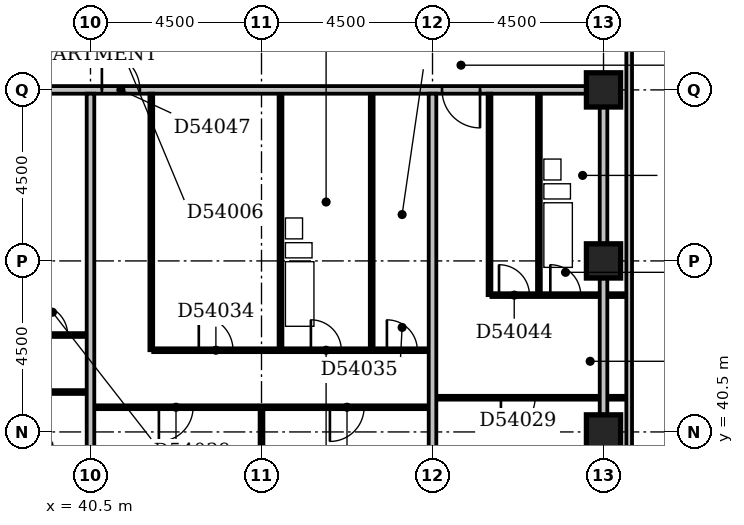
"""IFC4 building model, lengths in metres.
Left out: names, types, materials, properties, quantities, classifications, styles, units other than length and angle.
Written with IfcOpenShell. Run it as: python <this file> out.ifc"""

import sys

from ifc_helpers import new_model, si_unit, direction, frame, frame_2d, origin, origin_2d, place, context, subcontext, project, spatial, rectangle, extrude, element, fill, save


model = new_model("IFC4")
c1 = context("Model", 3, precision=1e-05, world=origin(), true_north=direction((0.0, 1.0)))
c2 = subcontext(c1, "Body", "Model", "MODEL_VIEW")
j1 = project(units=[si_unit("LENGTHUNIT", "METRE"), si_unit("PLANEANGLEUNIT", "RADIAN")], contexts=[c1])
p1 = place(None, origin())
s1 = spatial("IfcSite", under=j1, at=p1, CompositionType="ELEMENT")
p2 = place(p1, origin())
s2 = spatial("IfcBuilding", under=s1, at=p2, CompositionType="ELEMENT")
p3 = place(p2, frame((0.0, 0.0, 211.4)))
s3 = spatial("IfcBuildingStorey", under=s2, at=p3, CompositionType="ELEMENT", Elevation=211.4)
for number, where, z_axis, x_axis in (
    (1, (54.0, 40.5, -0.35), (0.0, 0.0, 1.0), (1.0, 0.0, 0.0)),
    (2, (54.0, 45.0, -0.35), (0.0, 0.0, 1.0), (1.0, 0.0, 0.0)),
    (3, (54.0, 49.5, -0.35), (0.0, 0.0, 1.0), (1.0, 0.0, 0.0)),
):
    element("IfcColumn", number, at=place(p3, frame(where, z_axis=z_axis, x_axis=x_axis)), inside=s3, PredefinedType="COLUMN", context=c2, shape_type="SweptSolid", body=[
        extrude(rectangle(XDim=0.9, YDim=0.9, at=origin_2d()), origin(), (0.0, 0.0, 1.0), 3.65),
    ])
p4 = place(p3, frame((54.675, 39.9, 0.0), z_axis=(0.0, 0.0, 1.0), x_axis=(0.0, 1.0, 0.0)))
e4 = element("IfcWall", 4, at=p4, inside=s3, PredefinedType="STANDARD", context=c2, shape_type="SweptSolid", body=[
    extrude(rectangle(XDim=14.85, YDim=0.15, at=frame_2d((7.425, 0.0))), origin(), (0.0, 0.0, 1.0), 2.7),
])
p5 = place(p3, frame((40.5, 36.45, 0.0), z_axis=(0.0, 0.0, 1.0), x_axis=(0.0, 1.0, 0.0)))
e5 = element("IfcWall", 5, at=p5, inside=s3, PredefinedType="PARTITIONING", context=c2, shape_type="SweptSolid", body=[
    extrude(rectangle(XDim=12.95, YDim=0.2, at=frame_2d((6.475, 0.0))), origin(), (0.0, 0.0, 1.0), 3.3),
])
p6 = place(p3, frame((45.0, 36.45, 0.0), z_axis=(0.0, 0.0, 1.0), x_axis=(0.0, 1.0, 0.0)))
e6 = element("IfcWall", 6, at=p6, inside=s3, PredefinedType="PARTITIONING", context=c2, shape_type="SweptSolid", body=[
    extrude(rectangle(XDim=4.65, YDim=0.1, at=frame_2d((2.325, 0.0))), origin(), (0.0, 0.0, 1.0), 2.6),
])
p7 = place(p3, frame((49.5, 36.45, 0.0), z_axis=(0.0, 0.0, 1.0), x_axis=(0.0, 1.0, 0.0)))
e7 = element("IfcWall", 7, at=p7, inside=s3, PredefinedType="PARTITIONING", context=c2, shape_type="SweptSolid", body=[
    extrude(rectangle(XDim=12.95, YDim=0.2, at=frame_2d((6.475, 0.0))), origin(), (0.0, 0.0, 1.0), 3.3),
])
p8 = place(p3, frame((54.0, 40.95, 0.0), z_axis=(0.0, 0.0, 1.0), x_axis=(0.0, 1.0, 0.0)))
e8 = element("IfcWall", 8, at=p8, inside=s3, PredefinedType="PARTITIONING", context=c2, shape_type="SweptSolid", body=[
    extrude(rectangle(XDim=8.1, YDim=0.2, at=frame_2d((4.05, 0.0))), origin(), (0.0, 0.0, 1.0), 2.7),
])
p9 = place(p3, frame((40.6, 41.15, 0.0), z_axis=(0.0, 0.0, 1.0), x_axis=(1.0, 0.0, 0.0)))
e9 = element("IfcWall", 9, at=p9, inside=s3, PredefinedType="PARTITIONING", context=c2, shape_type="SweptSolid", body=[
    extrude(rectangle(XDim=8.8, YDim=0.1, at=frame_2d((4.4, 0.0))), origin(), (0.0, 0.0, 1.0), 3.3),
])
p10 = place(p9, frame((1.7, 0.0, 0.0)))
e10 = element("IfcOpeningElement", 10, at=p10, cuts=e9, PredefinedType="OPENING", context=c2, shape_type="SweptSolid", body=[
    extrude(rectangle(XDim=0.9, YDim=2.1, at=frame_2d((0.45, 1.05))), frame((0.0, 0.062, 0.0), z_axis=(0.0, -1.0, 0.0), x_axis=(1.0, 0.0, 0.0)), (0.0, 0.0, 1.0), 0.124),
])
p11 = place(p9, frame((6.2, 0.0, 0.0)))
e11 = element("IfcOpeningElement", 11, at=p11, cuts=e9, PredefinedType="OPENING", context=c2, shape_type="SweptSolid", body=[
    extrude(rectangle(XDim=0.9, YDim=2.1, at=frame_2d((0.45, 1.05))), frame((0.0, 0.062, 0.0), z_axis=(0.0, -1.0, 0.0), x_axis=(1.0, 0.0, 0.0)), (0.0, 0.0, 1.0), 0.124),
])
p12 = place(p3, frame((49.6, 41.4, 0.0), z_axis=(0.0, 0.0, 1.0), x_axis=(1.0, 0.0, 0.0)))
e12 = element("IfcWall", 12, at=p12, inside=s3, PredefinedType="PARTITIONING", context=c2, shape_type="SweptSolid", body=[
    extrude(rectangle(XDim=5.0, YDim=0.1, at=frame_2d((2.5, 0.0))), origin(), (0.0, 0.0, 1.0), 3.3),
])
p13 = place(p12, frame((1.7, 0.0, 0.0)))
e13 = element("IfcOpeningElement", 13, at=p13, cuts=e12, PredefinedType="OPENING", context=c2, shape_type="SweptSolid", body=[
    extrude(rectangle(XDim=0.9, YDim=2.1, at=frame_2d((0.45, 1.05))), frame((0.0, 0.062, 0.0), z_axis=(0.0, -1.0, 0.0), x_axis=(1.0, 0.0, 0.0)), (0.0, 0.0, 1.0), 0.124),
])
p14 = place(p3, frame((27.1, 41.55, 0.0), z_axis=(0.0, 0.0, 1.0), x_axis=(1.0, 0.0, 0.0)))
e14 = element("IfcWall", 14, at=p14, inside=s3, PredefinedType="PARTITIONING", context=c2, shape_type="SweptSolid", body=[
    extrude(rectangle(XDim=13.3, YDim=0.1, at=frame_2d((6.65, 0.0))), origin(), (0.0, 0.0, 1.0), 3.3),
])
p15 = place(p14, frame((3.9, 0.0, 0.0)))
e15 = element("IfcOpeningElement", 15, at=p15, cuts=e14, PredefinedType="OPENING", context=c2, shape_type="SweptSolid", body=[
    extrude(rectangle(XDim=0.9, YDim=2.1, at=frame_2d((0.45, 1.05))), frame((0.0, 0.062, 0.0), z_axis=(0.0, -1.0, 0.0), x_axis=(1.0, 0.0, 0.0)), (0.0, 0.0, 1.0), 0.124),
])
p16 = place(p14, frame((10.7, 0.0, 0.0)))
e16 = element("IfcOpeningElement", 16, at=p16, cuts=e14, PredefinedType="OPENING", context=c2, shape_type="SweptSolid", body=[
    extrude(rectangle(XDim=0.9, YDim=2.1, at=frame_2d((0.45, 1.05))), frame((0.0, 0.062, 0.0), z_axis=(0.0, -1.0, 0.0), x_axis=(1.0, 0.0, 0.0)), (0.0, 0.0, 1.0), 0.124),
])
p17 = place(p3, frame((42.1, 42.65, 0.0), z_axis=(0.0, 0.0, 1.0), x_axis=(0.0, 1.0, 0.0)))
e17 = element("IfcWall", 17, at=p17, inside=s3, PredefinedType="PARTITIONING", context=c2, shape_type="SweptSolid", body=[
    extrude(rectangle(XDim=6.75, YDim=0.1, at=frame_2d((3.375, 0.0))), origin(), (0.0, 0.0, 1.0), 3.3),
])
p18 = place(p3, frame((42.15, 42.65, 0.0), z_axis=(0.0, 0.0, 1.0), x_axis=(1.0, 0.0, 0.0)))
e18 = element("IfcWall", 18, at=p18, inside=s3, PredefinedType="PARTITIONING", context=c2, shape_type="SweptSolid", body=[
    extrude(rectangle(XDim=7.25, YDim=0.1, at=frame_2d((3.625, 0.0))), origin(), (0.0, 0.0, 1.0), 3.3),
])
p19 = place(p18, frame((4.15, 0.0, 0.0)))
e19 = element("IfcOpeningElement", 19, at=p19, cuts=e18, PredefinedType="OPENING", context=c2, shape_type="SweptSolid", body=[
    extrude(rectangle(XDim=0.8, YDim=2.1, at=frame_2d((0.4, 1.05))), frame((0.0, 0.062, 0.0), z_axis=(0.0, -1.0, 0.0), x_axis=(1.0, 0.0, 0.0)), (0.0, 0.0, 1.0), 0.124),
])
p20 = place(p18, frame((1.2, 0.0, 0.0)))
e20 = element("IfcOpeningElement", 20, at=p20, cuts=e18, PredefinedType="OPENING", context=c2, shape_type="SweptSolid", body=[
    extrude(rectangle(XDim=0.9, YDim=2.1, at=frame_2d((0.45, 1.05))), frame((0.0, 0.062, 0.0), z_axis=(0.0, -1.0, 0.0), x_axis=(1.0, 0.0, 0.0)), (0.0, 0.0, 1.0), 0.124),
])
p21 = place(p18, frame((6.15, 0.0, 0.0)))
e21 = element("IfcOpeningElement", 21, at=p21, cuts=e18, PredefinedType="OPENING", context=c2, shape_type="SweptSolid", body=[
    extrude(rectangle(XDim=0.8, YDim=2.1, at=frame_2d((0.4, 1.05))), frame((0.0, 0.062, 0.0), z_axis=(0.0, -1.0, 0.0), x_axis=(1.0, 0.0, 0.0)), (0.0, 0.0, 1.0), 0.124),
])
p22 = place(p3, frame((45.5, 42.7, 0.0), z_axis=(0.0, 0.0, 1.0), x_axis=(0.0, 1.0, 0.0)))
e22 = element("IfcWall", 22, at=p22, inside=s3, PredefinedType="PLUMBINGWALL", context=c2, shape_type="SweptSolid", body=[
    extrude(rectangle(XDim=6.7, YDim=0.1, at=frame_2d((3.35, 0.0))), origin(), (0.0, 0.0, 1.0), 2.6),
])
p23 = place(p3, frame((47.9, 42.7, 0.0), z_axis=(0.0, 0.0, 1.0), x_axis=(0.0, 1.0, 0.0)))
e23 = element("IfcWall", 23, at=p23, inside=s3, PredefinedType="PLUMBINGWALL", context=c2, shape_type="SweptSolid", body=[
    extrude(rectangle(XDim=6.7, YDim=0.1, at=frame_2d((3.35, 0.0))), origin(), (0.0, 0.0, 1.0), 3.3),
])
p24 = place(p3, frame((28.65, 43.05, 0.0), z_axis=(0.0, 0.0, 1.0), x_axis=(1.0, 0.0, 0.0)))
e24 = element("IfcWall", 24, at=p24, inside=s3, PredefinedType="PARTITIONING", context=c2, shape_type="SweptSolid", body=[
    extrude(rectangle(XDim=11.75, YDim=0.1, at=frame_2d((5.875, 0.0))), origin(), (0.0, 0.0, 1.0), 3.3),
])
p25 = place(p24, frame((5.15, 0.0, 0.0)))
e25 = element("IfcOpeningElement", 25, at=p25, cuts=e24, PredefinedType="OPENING", context=c2, shape_type="SweptSolid", body=[
    extrude(rectangle(XDim=0.8, YDim=2.1, at=frame_2d((0.4, 1.05))), frame((0.0, 0.062, 0.0), z_axis=(0.0, -1.0, 0.0), x_axis=(1.0, 0.0, 0.0)), (0.0, 0.0, 1.0), 0.124),
])
p26 = place(p24, frame((1.7, 0.0, 0.0)))
e26 = element("IfcOpeningElement", 26, at=p26, cuts=e24, PredefinedType="OPENING", context=c2, shape_type="SweptSolid", body=[
    extrude(rectangle(XDim=0.9, YDim=2.1, at=frame_2d((0.45, 1.05))), frame((0.0, 0.062, 0.0), z_axis=(0.0, -1.0, 0.0), x_axis=(1.0, 0.0, 0.0)), (0.0, 0.0, 1.0), 0.124),
])
p27 = place(p24, frame((8.65, 0.0, 0.0)))
e27 = element("IfcOpeningElement", 27, at=p27, cuts=e24, PredefinedType="OPENING", context=c2, shape_type="SweptSolid", body=[
    extrude(rectangle(XDim=0.8, YDim=2.1, at=frame_2d((0.4, 1.05))), frame((0.0, 0.062, 0.0), z_axis=(0.0, -1.0, 0.0), x_axis=(1.0, 0.0, 0.0)), (0.0, 0.0, 1.0), 0.124),
])
p28 = place(p24, frame((10.45, 0.0, 0.0)))
e28 = element("IfcOpeningElement", 28, at=p28, cuts=e24, PredefinedType="OPENING", context=c2, shape_type="SweptSolid", body=[
    extrude(rectangle(XDim=0.8, YDim=2.1, at=frame_2d((0.4, 1.05))), frame((0.0, 0.062, 0.0), z_axis=(0.0, -1.0, 0.0), x_axis=(1.0, 0.0, 0.0)), (0.0, 0.0, 1.0), 0.124),
])
p29 = place(p24, frame((7.1, 0.0, 0.0)))
e29 = element("IfcOpeningElement", 29, at=p29, cuts=e24, PredefinedType="OPENING", context=c2, shape_type="SweptSolid", body=[
    extrude(rectangle(XDim=0.8, YDim=2.1, at=frame_2d((0.4, 1.05))), frame((0.0, 0.062, 0.0), z_axis=(0.0, -1.0, 0.0), x_axis=(1.0, 0.0, 0.0)), (0.0, 0.0, 1.0), 0.124),
])
p30 = place(p3, frame((51.0, 44.1, 0.0), z_axis=(0.0, 0.0, 1.0), x_axis=(0.0, 1.0, 0.0)))
e30 = element("IfcWall", 30, at=p30, inside=s3, PredefinedType="PARTITIONING", context=c2, shape_type="SweptSolid", body=[
    extrude(rectangle(XDim=5.3, YDim=0.1, at=frame_2d((2.65, 0.0))), origin(), (0.0, 0.0, 1.0), 3.3),
])
p31 = place(p3, frame((51.05, 44.1, 0.0), z_axis=(0.0, 0.0, 1.0), x_axis=(1.0, 0.0, 0.0)))
e31 = element("IfcWall", 31, at=p31, inside=s3, PredefinedType="PARTITIONING", context=c2, shape_type="SweptSolid", body=[
    extrude(rectangle(XDim=3.55, YDim=0.1, at=frame_2d((1.775, 0.0))), origin(), (0.0, 0.0, 1.0), 3.3),
])
p32 = place(p31, frame((1.55, 0.0, 0.0)))
e32 = element("IfcOpeningElement", 32, at=p32, cuts=e31, PredefinedType="OPENING", context=c2, shape_type="SweptSolid", body=[
    extrude(rectangle(XDim=0.8, YDim=2.1, at=frame_2d((0.4, 1.05))), frame((0.0, 0.062, 0.0), z_axis=(0.0, -1.0, 0.0), x_axis=(1.0, 0.0, 0.0)), (0.0, 0.0, 1.0), 0.124),
])
p33 = place(p31, frame((0.2, 0.0, 0.0)))
e33 = element("IfcOpeningElement", 33, at=p33, cuts=e31, PredefinedType="OPENING", context=c2, shape_type="SweptSolid", body=[
    extrude(rectangle(XDim=0.8, YDim=2.1, at=frame_2d((0.4, 1.05))), frame((0.0, 0.062, 0.0), z_axis=(0.0, -1.0, 0.0), x_axis=(1.0, 0.0, 0.0)), (0.0, 0.0, 1.0), 0.124),
])
p34 = place(p3, frame((52.3, 44.15, 0.0), z_axis=(0.0, 0.0, 1.0), x_axis=(0.0, 1.0, 0.0)))
e34 = element("IfcWall", 34, at=p34, inside=s3, PredefinedType="PLUMBINGWALL", context=c2, shape_type="SweptSolid", body=[
    extrude(rectangle(XDim=5.25, YDim=0.1, at=frame_2d((2.625, 0.0))), origin(), (0.0, 0.0, 1.0), 3.3),
])
p35 = place(p3, frame((22.6, 49.5, 0.0), z_axis=(0.0, 0.0, 1.0), x_axis=(1.0, 0.0, 0.0)))
e35 = element("IfcWall", 35, at=p35, inside=s3, PredefinedType="PARTITIONING", context=c2, shape_type="SweptSolid", body=[
    extrude(rectangle(XDim=30.95, YDim=0.2, at=frame_2d((15.475, 0.0))), origin(), (0.0, 0.0, 1.0), 3.3),
])
p36 = place(p35, frame((1.85, 0.0, 0.0)))
e36 = element("IfcOpeningElement", 36, at=p36, cuts=e35, PredefinedType="OPENING", context=c2, shape_type="SweptSolid", body=[
    extrude(rectangle(XDim=1.0, YDim=2.1, at=frame_2d((0.5, 1.05))), frame((0.0, 0.112, 0.0), z_axis=(0.0, -1.0, 0.0), x_axis=(1.0, 0.0, 0.0)), (0.0, 0.0, 1.0), 0.224),
])
p37 = place(p35, frame((4.7, 0.0, 0.0)))
e37 = element("IfcOpeningElement", 37, at=p37, cuts=e35, PredefinedType="OPENING", context=c2, shape_type="SweptSolid", body=[
    extrude(rectangle(XDim=1.0, YDim=2.1, at=frame_2d((0.5, 1.05))), frame((0.0, 0.112, 0.0), z_axis=(0.0, -1.0, 0.0), x_axis=(1.0, 0.0, 0.0)), (0.0, 0.0, 1.0), 0.224),
])
p38 = place(p35, frame((18.2, 0.0, 0.0)))
e38 = element("IfcOpeningElement", 38, at=p38, cuts=e35, PredefinedType="OPENING", context=c2, shape_type="SweptSolid", body=[
    extrude(rectangle(XDim=1.0, YDim=2.1, at=frame_2d((0.5, 1.05))), frame((0.0, 0.112, 0.0), z_axis=(0.0, -1.0, 0.0), x_axis=(1.0, 0.0, 0.0)), (0.0, 0.0, 1.0), 0.224),
])
p39 = place(p35, frame((27.15, 0.0, 0.0)))
e39 = element("IfcOpeningElement", 39, at=p39, cuts=e35, PredefinedType="OPENING", context=c2, shape_type="SweptSolid", body=[
    extrude(rectangle(XDim=1.0, YDim=2.1, at=frame_2d((0.5, 1.05))), frame((0.0, 0.112, 0.0), z_axis=(0.0, -1.0, 0.0), x_axis=(1.0, 0.0, 0.0)), (0.0, 0.0, 1.0), 0.224),
])
p40 = place(p10, frame((0.9, 0.0, 0.0), z_axis=(0.0, 0.0, 1.0), x_axis=(-1.0, 0.0, 0.0)))
e40 = element("IfcDoor", 40, at=p40, inside=s3, OperationType="SINGLE_SWING_RIGHT", PredefinedType="DOOR", context=c2, shape_type="SweptSolid", body=[
    extrude(rectangle(XDim=0.9, YDim=2.1, at=frame_2d((0.45, 1.05))), frame((0.0, 0.025, 0.0), z_axis=(0.0, -1.0, 0.0), x_axis=(1.0, 0.0, 0.0)), (0.0, 0.0, 1.0), 0.05),
])
fill(e10, e40)
p41 = place(p11, frame((0.9, 0.0, 0.0), z_axis=(0.0, 0.0, 1.0), x_axis=(-1.0, 0.0, 0.0)))
e41 = element("IfcDoor", 41, at=p41, inside=s3, OperationType="SINGLE_SWING_RIGHT", PredefinedType="DOOR", context=c2, shape_type="SweptSolid", body=[
    extrude(rectangle(XDim=0.9, YDim=2.1, at=frame_2d((0.45, 1.05))), frame((0.0, 0.025, 0.0), z_axis=(0.0, -1.0, 0.0), x_axis=(1.0, 0.0, 0.0)), (0.0, 0.0, 1.0), 0.05),
])
fill(e11, e41)
p42 = place(p13, frame((0.9, 0.0, 0.0), z_axis=(0.0, 0.0, 1.0), x_axis=(-1.0, 0.0, 0.0)))
e42 = element("IfcDoor", 42, at=p42, inside=s3, OperationType="SINGLE_SWING_RIGHT", PredefinedType="DOOR", context=c2, shape_type="SweptSolid", body=[
    extrude(rectangle(XDim=0.9, YDim=2.1, at=frame_2d((0.45, 1.05))), frame((0.0, 0.025, 0.0), z_axis=(0.0, -1.0, 0.0), x_axis=(1.0, 0.0, 0.0)), (0.0, 0.0, 1.0), 0.05),
])
fill(e13, e42)
p43 = place(p19, origin())
e43 = element("IfcDoor", 43, at=p43, inside=s3, OperationType="SINGLE_SWING_LEFT", PredefinedType="DOOR", context=c2, shape_type="SweptSolid", body=[
    extrude(rectangle(XDim=0.8, YDim=2.1, at=frame_2d((0.4, 1.05))), frame((0.0, 0.025, 0.0), z_axis=(0.0, -1.0, 0.0), x_axis=(1.0, 0.0, 0.0)), (0.0, 0.0, 1.0), 0.05),
])
fill(e19, e43)
p44 = place(p20, origin())
e44 = element("IfcDoor", 44, at=p44, inside=s3, OperationType="SINGLE_SWING_LEFT", PredefinedType="DOOR", context=c2, shape_type="SweptSolid", body=[
    extrude(rectangle(XDim=0.9, YDim=2.1, at=frame_2d((0.45, 1.05))), frame((0.0, 0.025, 0.0), z_axis=(0.0, -1.0, 0.0), x_axis=(1.0, 0.0, 0.0)), (0.0, 0.0, 1.0), 0.05),
])
fill(e20, e44)
p45 = place(p21, origin())
e45 = element("IfcDoor", 45, at=p45, inside=s3, OperationType="SINGLE_SWING_LEFT", PredefinedType="DOOR", context=c2, shape_type="SweptSolid", body=[
    extrude(rectangle(XDim=0.8, YDim=2.1, at=frame_2d((0.4, 1.05))), frame((0.0, 0.025, 0.0), z_axis=(0.0, -1.0, 0.0), x_axis=(1.0, 0.0, 0.0)), (0.0, 0.0, 1.0), 0.05),
])
fill(e21, e45)
p46 = place(p28, origin())
e46 = element("IfcDoor", 46, at=p46, inside=s3, OperationType="SINGLE_SWING_LEFT", PredefinedType="DOOR", context=c2, shape_type="SweptSolid", body=[
    extrude(rectangle(XDim=0.8, YDim=2.1, at=frame_2d((0.4, 1.05))), frame((0.0, 0.025, 0.0), z_axis=(0.0, -1.0, 0.0), x_axis=(1.0, 0.0, 0.0)), (0.0, 0.0, 1.0), 0.05),
])
fill(e28, e46)
p47 = place(p32, origin())
e47 = element("IfcDoor", 47, at=p47, inside=s3, OperationType="SINGLE_SWING_LEFT", PredefinedType="DOOR", context=c2, shape_type="SweptSolid", body=[
    extrude(rectangle(XDim=0.8, YDim=2.1, at=frame_2d((0.4, 1.05))), frame((0.0, 0.025, 0.0), z_axis=(0.0, -1.0, 0.0), x_axis=(1.0, 0.0, 0.0)), (0.0, 0.0, 1.0), 0.05),
])
fill(e32, e47)
p48 = place(p33, origin())
e48 = element("IfcDoor", 48, at=p48, inside=s3, OperationType="SINGLE_SWING_LEFT", PredefinedType="DOOR", context=c2, shape_type="SweptSolid", body=[
    extrude(rectangle(XDim=0.8, YDim=2.1, at=frame_2d((0.4, 1.05))), frame((0.0, 0.025, 0.0), z_axis=(0.0, -1.0, 0.0), x_axis=(1.0, 0.0, 0.0)), (0.0, 0.0, 1.0), 0.05),
])
fill(e33, e48)
p49 = place(p38, origin())
e49 = element("IfcDoor", 49, at=p49, inside=s3, OperationType="SINGLE_SWING_LEFT", PredefinedType="DOOR", context=c2, shape_type="SweptSolid", body=[
    extrude(rectangle(XDim=1.0, YDim=2.1, at=frame_2d((0.5, 1.05))), frame((0.0, 0.025, 0.0), z_axis=(0.0, -1.0, 0.0), x_axis=(1.0, 0.0, 0.0)), (0.0, 0.0, 1.0), 0.05),
])
fill(e38, e49)
p50 = place(p39, origin())
e50 = element("IfcDoor", 50, at=p50, inside=s3, OperationType="SINGLE_SWING_RIGHT", PredefinedType="DOOR", context=c2, shape_type="SweptSolid", body=[
    extrude(rectangle(XDim=1.0, YDim=2.1, at=frame_2d((0.5, 1.05))), frame((0.0, 0.025, 0.0), z_axis=(0.0, -1.0, 0.0), x_axis=(1.0, 0.0, 0.0)), (0.0, 0.0, 1.0), 0.05),
])
fill(e39, e50)
save(model, sys.argv[1])
